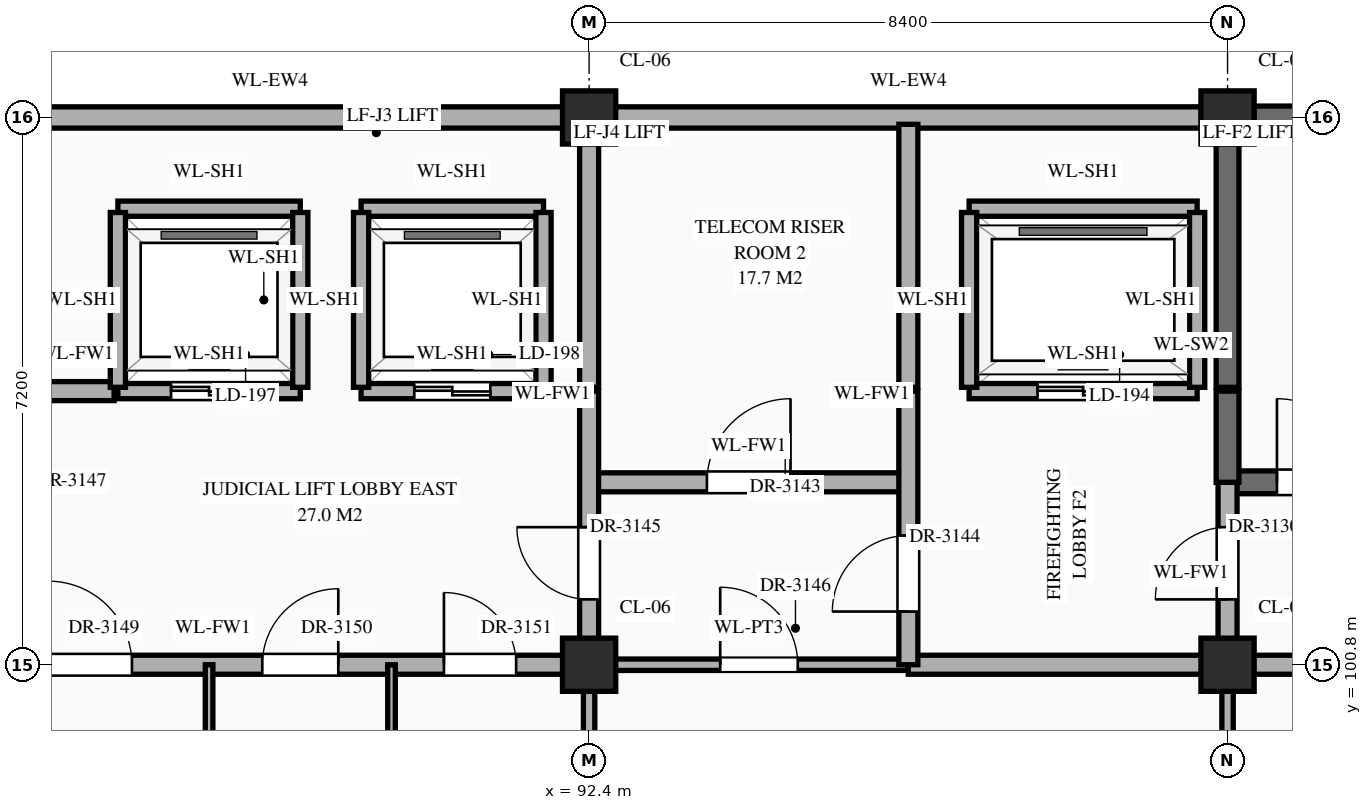
"""IFC4 building model, lengths in metres.
Left out: names, types, materials, properties, quantities, classifications, styles, units other than length and angle.
Written with IfcOpenShell. Run it as: python <this file> out.ifc"""

import sys

from ifc_helpers import new_model, si_unit, direction, frame, frame_2d, origin, origin_2d, place, context, subcontext, project, spatial, rectangle, extrude, element, fill, save


model = new_model("IFC4")
c1 = context("Model", 3, precision=1e-05, world=origin(), true_north=direction((0.0, 1.0)))
c2 = subcontext(c1, "Body", "Model", "MODEL_VIEW")
j1 = project(units=[si_unit("LENGTHUNIT", "METRE"), si_unit("PLANEANGLEUNIT", "RADIAN")], contexts=[c1])
p1 = place(None, origin())
s1 = spatial("IfcSite", under=j1, at=p1, CompositionType="ELEMENT")
p2 = place(p1, origin())
s2 = spatial("IfcBuilding", under=s1, at=p2, CompositionType="ELEMENT")
p3 = place(p2, frame((0.0, 0.0, 56.1)))
s3 = spatial("IfcBuildingStorey", under=s2, at=p3, CompositionType="ELEMENT", Elevation=56.1)
for number, where, z_axis, x_axis in (
    (1, (92.4, 100.8, 0.0), (0.0, 0.0, 1.0), (1.0, 0.0, 0.0)),
    (2, (92.4, 108.0, 0.0), (0.0, 0.0, 1.0), (1.0, 0.0, 0.0)),
    (3, (100.8, 100.8, 0.0), (0.0, 0.0, 1.0), (1.0, 0.0, 0.0)),
    (4, (100.8, 108.0, 0.0), (0.0, 0.0, 1.0), (1.0, 0.0, 0.0)),
):
    element("IfcColumn", number, at=place(p3, frame(where, z_axis=z_axis, x_axis=x_axis)), inside=s3, PredefinedType="COLUMN", context=c2, shape_type="SweptSolid", body=[
        extrude(rectangle(XDim=0.7, YDim=0.7, at=origin_2d()), origin(), (0.0, 0.0, 1.0), 4.2),
    ])
for number, where, z_axis, x_axis in (
    (5, (84.345, 108.0, 0.0), (0.0, 0.0, 1.0), (1.0, 0.0, 0.0)),
    (6, (92.745, 108.0, 0.0), (0.0, 0.0, 1.0), (1.0, 0.0, 0.0)),
):
    element("IfcWall", number, at=place(p3, frame(where, z_axis=z_axis, x_axis=x_axis)), inside=s3, PredefinedType="STANDARD", context=c2, shape_type="SweptSolid", body=[
        extrude(rectangle(XDim=7.71, YDim=0.28, at=frame_2d((3.855, 0.0))), origin(), (0.0, 0.0, 1.0), 3.31),
    ])
p4 = place(p3, frame((101.145, 108.0, 0.0), z_axis=(0.0, 0.0, 1.0), x_axis=(1.0, 0.0, 0.0)))
e7 = element("IfcWall", 7, at=p4, inside=s3, PredefinedType="SHEAR", context=c2, shape_type="SweptSolid", body=[
    extrude(rectangle(XDim=7.71, YDim=0.3, at=frame_2d((3.855, 0.0))), origin(), (0.0, 0.0, 1.0), 3.96),
])
p5 = place(p3, frame((75.6, 100.8, 0.0), z_axis=(0.0, 0.0, 1.0), x_axis=(1.0, 0.0, 0.0)))
e8 = element("IfcWall", 8, at=p5, inside=s3, PredefinedType="STANDARD", context=c2, shape_type="SweptSolid", body=[
    extrude(rectangle(XDim=16.8, YDim=0.25, at=frame_2d((8.4, 0.0))), origin(), (0.0, 0.0, 1.0), 3.11),
])
p6 = place(p5, frame((3.725, 0.0, 0.0)))
e9 = element("IfcOpeningElement", 9, at=p6, cuts=e8, PredefinedType="OPENING", context=c2, shape_type="SweptSolid", body=[
    extrude(rectangle(XDim=0.95, YDim=2.15, at=frame_2d((0.475, 1.075))), frame((0.0, 0.137, 0.0), z_axis=(0.0, -1.0, 0.0), x_axis=(1.0, 0.0, 0.0)), (0.0, 0.0, 1.0), 0.274),
])
p7 = place(p5, frame((9.685, 0.0, 0.0)))
e10 = element("IfcOpeningElement", 10, at=p7, cuts=e8, PredefinedType="OPENING", context=c2, shape_type="SweptSolid", body=[
    extrude(rectangle(XDim=1.1, YDim=2.2, at=frame_2d((0.55, 1.1))), frame((0.0, 0.137, 0.0), z_axis=(0.0, -1.0, 0.0), x_axis=(1.0, 0.0, 0.0)), (0.0, 0.0, 1.0), 0.274),
])
p8 = place(p5, frame((12.5, 0.0, 0.0)))
e11 = element("IfcOpeningElement", 11, at=p8, cuts=e8, PredefinedType="OPENING", context=c2, shape_type="SweptSolid", body=[
    extrude(rectangle(XDim=1.0, YDim=2.2, at=frame_2d((0.5, 1.1))), frame((0.0, 0.137, 0.0), z_axis=(0.0, -1.0, 0.0), x_axis=(1.0, 0.0, 0.0)), (0.0, 0.0, 1.0), 0.274),
])
p9 = place(p5, frame((14.89, 0.0, 0.0)))
e12 = element("IfcOpeningElement", 12, at=p9, cuts=e8, PredefinedType="OPENING", context=c2, shape_type="SweptSolid", body=[
    extrude(rectangle(XDim=0.95, YDim=2.15, at=frame_2d((0.475, 1.075))), frame((0.0, 0.137, 0.0), z_axis=(0.0, -1.0, 0.0), x_axis=(1.0, 0.0, 0.0)), (0.0, 0.0, 1.0), 0.274),
])
p10 = place(p3, frame((92.4, 100.8, 0.0), z_axis=(0.0, 0.0, 1.0), x_axis=(1.0, 0.0, 0.0)))
e13 = element("IfcWall", 13, at=p10, inside=s3, PredefinedType="STANDARD", context=c2, shape_type="SweptSolid", body=[
    extrude(rectangle(XDim=4.2, YDim=0.15, at=frame_2d((2.1, 0.0))), origin(), (0.0, 0.0, 1.0), 3.11),
])
p11 = place(p10, frame((1.725, 0.0, 0.0)))
e14 = element("IfcOpeningElement", 14, at=p11, cuts=e13, PredefinedType="OPENING", context=c2, shape_type="SweptSolid", body=[
    extrude(rectangle(XDim=1.02, YDim=2.4, at=frame_2d((0.51, 1.2))), frame((0.0, 0.087, 0.0), z_axis=(0.0, -1.0, 0.0), x_axis=(1.0, 0.0, 0.0)), (0.0, 0.0, 1.0), 0.174),
])
p12 = place(p3, frame((96.6, 100.8, 0.0), z_axis=(0.0, 0.0, 1.0), x_axis=(1.0, 0.0, 0.0)))
e15 = element("IfcWall", 15, at=p12, inside=s3, PredefinedType="STANDARD", context=c2, shape_type="SweptSolid", body=[
    extrude(rectangle(XDim=12.6, YDim=0.25, at=frame_2d((6.3, 0.0))), origin(), (0.0, 0.0, 1.0), 3.11),
])
p13 = place(p12, frame((7.9, 0.0, 0.0)))
e16 = element("IfcOpeningElement", 16, at=p13, cuts=e15, PredefinedType="OPENING", context=c2, shape_type="SweptSolid", body=[
    extrude(rectangle(XDim=1.0, YDim=2.2, at=frame_2d((0.5, 1.1))), frame((0.0, 0.137, 0.0), z_axis=(0.0, -1.0, 0.0), x_axis=(1.0, 0.0, 0.0)), (0.0, 0.0, 1.0), 0.274),
])
p14 = place(p3, frame((92.4, 103.2, 0.0), z_axis=(0.0, 0.0, 1.0), x_axis=(1.0, 0.0, 0.0)))
e17 = element("IfcWall", 17, at=p14, inside=s3, PredefinedType="STANDARD", context=c2, shape_type="SweptSolid", body=[
    extrude(rectangle(XDim=4.2, YDim=0.25, at=frame_2d((2.1, 0.0))), origin(), (0.0, 0.0, 1.0), 3.96),
])
p15 = place(p14, frame((1.55, 0.0, 0.0)))
e18 = element("IfcOpeningElement", 18, at=p15, cuts=e17, PredefinedType="OPENING", context=c2, shape_type="SweptSolid", body=[
    extrude(rectangle(XDim=1.1, YDim=2.2, at=frame_2d((0.55, 1.1))), frame((0.0, 0.137, 0.0), z_axis=(0.0, -1.0, 0.0), x_axis=(1.0, 0.0, 0.0)), (0.0, 0.0, 1.0), 0.274),
])
p16 = place(p3, frame((100.8, 103.2, 0.0), z_axis=(0.0, 0.0, 1.0), x_axis=(1.0, 0.0, 0.0)))
e19 = element("IfcWall", 19, at=p16, inside=s3, PredefinedType="SHEAR", context=c2, shape_type="SweptSolid", body=[
    extrude(rectangle(XDim=8.4, YDim=0.3, at=frame_2d((4.2, 0.0))), origin(), (0.0, 0.0, 1.0), 3.96),
])
p17 = place(p16, frame((0.65, 0.0, 0.0)))
e20 = element("IfcOpeningElement", 20, at=p17, cuts=e19, PredefinedType="OPENING", context=c2, shape_type="SweptSolid", body=[
    extrude(rectangle(XDim=1.1, YDim=2.2, at=frame_2d((0.55, 1.1))), frame((0.0, 0.162, 0.0), z_axis=(0.0, -1.0, 0.0), x_axis=(1.0, 0.0, 0.0)), (0.0, 0.0, 1.0), 0.324),
])
p18 = place(p3, frame((84.05, 104.4, 0.0), z_axis=(0.0, 0.0, 1.0), x_axis=(1.0, 0.0, 0.0)))
e21 = element("IfcWall", 21, at=p18, inside=s3, PredefinedType="STANDARD", context=c2, shape_type="SweptSolid", body=[
    extrude(rectangle(XDim=2.1, YDim=0.25, at=frame_2d((1.05, 0.0))), origin(), (0.0, 0.0, 1.0), 3.96),
])
p19 = place(p3, frame((86.2, 104.4, 0.0), z_axis=(0.0, 0.0, 1.0), x_axis=(1.0, 0.0, 0.0)))
e22 = element("IfcWall", 22, at=p19, inside=s3, PredefinedType="STANDARD", context=c2, shape_type="SweptSolid", body=[
    extrude(rectangle(XDim=2.4, YDim=0.2, at=frame_2d((1.2, 0.0))), origin(), (0.0, 0.0, 1.0), 3.96),
])
p20 = place(p19, frame((0.7, 0.0, 0.0)))
e23 = element("IfcOpeningElement", 23, at=p20, cuts=e22, PredefinedType="OPENING", context=c2, shape_type="SweptSolid", body=[
    extrude(rectangle(XDim=1.0, YDim=2.15, at=frame_2d((0.5, 1.075))), frame((0.0, 0.112, 0.0), z_axis=(0.0, -1.0, 0.0), x_axis=(1.0, 0.0, 0.0)), (0.0, 0.0, 1.0), 0.224),
])
p21 = place(p3, frame((89.4, 104.4, 0.0), z_axis=(0.0, 0.0, 1.0), x_axis=(1.0, 0.0, 0.0)))
e24 = element("IfcWall", 24, at=p21, inside=s3, PredefinedType="STANDARD", context=c2, shape_type="SweptSolid", body=[
    extrude(rectangle(XDim=2.4, YDim=0.2, at=frame_2d((1.2, 0.0))), origin(), (0.0, 0.0, 1.0), 3.96),
])
p22 = place(p21, frame((0.7, 0.0, 0.0)))
e25 = element("IfcOpeningElement", 25, at=p22, cuts=e24, PredefinedType="OPENING", context=c2, shape_type="SweptSolid", body=[
    extrude(rectangle(XDim=1.0, YDim=2.15, at=frame_2d((0.5, 1.075))), frame((0.0, 0.112, 0.0), z_axis=(0.0, -1.0, 0.0), x_axis=(1.0, 0.0, 0.0)), (0.0, 0.0, 1.0), 0.224),
])
p23 = place(p3, frame((97.4, 104.4, 0.0), z_axis=(0.0, 0.0, 1.0), x_axis=(1.0, 0.0, 0.0)))
e26 = element("IfcWall", 26, at=p23, inside=s3, PredefinedType="STANDARD", context=c2, shape_type="SweptSolid", body=[
    extrude(rectangle(XDim=3.0, YDim=0.2, at=frame_2d((1.5, 0.0))), origin(), (0.0, 0.0, 1.0), 3.96),
])
p24 = place(p23, frame((0.9, 0.0, 0.0)))
e27 = element("IfcOpeningElement", 27, at=p24, cuts=e26, PredefinedType="OPENING", context=c2, shape_type="SweptSolid", body=[
    extrude(rectangle(XDim=1.2, YDim=2.15, at=frame_2d((0.6, 1.075))), frame((0.0, 0.112, 0.0), z_axis=(0.0, -1.0, 0.0), x_axis=(1.0, 0.0, 0.0)), (0.0, 0.0, 1.0), 0.224),
])
for number, where, z_axis, x_axis in (
    (28, (86.2, 106.8, 0.0), (0.0, 0.0, 1.0), (1.0, 0.0, 0.0)),
    (29, (89.4, 106.8, 0.0), (0.0, 0.0, 1.0), (1.0, 0.0, 0.0)),
):
    element("IfcWall", number, at=place(p3, frame(where, z_axis=z_axis, x_axis=x_axis)), inside=s3, PredefinedType="STANDARD", context=c2, shape_type="SweptSolid", body=[
        extrude(rectangle(XDim=2.4, YDim=0.2, at=frame_2d((1.2, 0.0))), origin(), (0.0, 0.0, 1.0), 3.96),
    ])
p25 = place(p3, frame((97.4, 106.8, 0.0), z_axis=(0.0, 0.0, 1.0), x_axis=(1.0, 0.0, 0.0)))
e30 = element("IfcWall", 30, at=p25, inside=s3, PredefinedType="STANDARD", context=c2, shape_type="SweptSolid", body=[
    extrude(rectangle(XDim=3.0, YDim=0.2, at=frame_2d((1.5, 0.0))), origin(), (0.0, 0.0, 1.0), 3.96),
])
p26 = place(p3, frame((86.2, 104.45, 0.0), z_axis=(0.0, 0.0, 1.0), x_axis=(0.0, 1.0, 0.0)))
e31 = element("IfcWall", 31, at=p26, inside=s3, PredefinedType="STANDARD", context=c2, shape_type="SweptSolid", body=[
    extrude(rectangle(XDim=2.3, YDim=0.2, at=frame_2d((1.15, 0.0))), origin(), (0.0, 0.0, 1.0), 3.96),
])
p27 = place(p3, frame((87.4, 96.0, 0.0), z_axis=(0.0, 0.0, 1.0), x_axis=(0.0, 1.0, 0.0)))
e32 = element("IfcWall", 32, at=p27, inside=s3, PredefinedType="STANDARD", context=c2, shape_type="SweptSolid", body=[
    extrude(rectangle(XDim=4.8, YDim=0.1, at=frame_2d((2.4, 0.0))), origin(), (0.0, 0.0, 1.0), 3.96),
])
p28 = place(p27, frame((1.76, 0.0, 0.0)))
e33 = element("IfcOpeningElement", 33, at=p28, cuts=e32, PredefinedType="OPENING", context=c2, shape_type="SweptSolid", body=[
    extrude(rectangle(XDim=1.28, YDim=2.35, at=frame_2d((0.64, 1.175))), frame((0.0, 0.062, 0.0), z_axis=(0.0, -1.0, 0.0), x_axis=(1.0, 0.0, 0.0)), (0.0, 0.0, 1.0), 0.124),
])
for number, where, z_axis, x_axis in (
    (34, (88.6, 104.45, 0.0), (0.0, 0.0, 1.0), (0.0, 1.0, 0.0)),
    (35, (89.4, 104.45, 0.0), (0.0, 0.0, 1.0), (0.0, 1.0, 0.0)),
):
    element("IfcWall", number, at=place(p3, frame(where, z_axis=z_axis, x_axis=x_axis)), inside=s3, PredefinedType="STANDARD", context=c2, shape_type="SweptSolid", body=[
        extrude(rectangle(XDim=2.3, YDim=0.2, at=frame_2d((1.15, 0.0))), origin(), (0.0, 0.0, 1.0), 3.96),
    ])
p29 = place(p3, frame((89.8, 96.0, 0.0), z_axis=(0.0, 0.0, 1.0), x_axis=(0.0, 1.0, 0.0)))
e36 = element("IfcWall", 36, at=p29, inside=s3, PredefinedType="STANDARD", context=c2, shape_type="SweptSolid", body=[
    extrude(rectangle(XDim=4.8, YDim=0.1, at=frame_2d((2.4, 0.0))), origin(), (0.0, 0.0, 1.0), 3.96),
])
p30 = place(p29, frame((1.93, 0.0, 0.0)))
e37 = element("IfcOpeningElement", 37, at=p30, cuts=e36, PredefinedType="OPENING", context=c2, shape_type="SweptSolid", body=[
    extrude(rectangle(XDim=0.94, YDim=2.3, at=frame_2d((0.47, 1.15))), frame((0.0, 0.062, 0.0), z_axis=(0.0, -1.0, 0.0), x_axis=(1.0, 0.0, 0.0)), (0.0, 0.0, 1.0), 0.124),
])
p31 = place(p3, frame((91.8, 104.45, 0.0), z_axis=(0.0, 0.0, 1.0), x_axis=(0.0, 1.0, 0.0)))
e38 = element("IfcWall", 38, at=p31, inside=s3, PredefinedType="STANDARD", context=c2, shape_type="SweptSolid", body=[
    extrude(rectangle(XDim=2.3, YDim=0.2, at=frame_2d((1.15, 0.0))), origin(), (0.0, 0.0, 1.0), 3.96),
])
p32 = place(p3, frame((92.4, 96.0, 0.0), z_axis=(0.0, 0.0, 1.0), x_axis=(0.0, 1.0, 0.0)))
e39 = element("IfcWall", 39, at=p32, inside=s3, PredefinedType="STANDARD", context=c2, shape_type="SweptSolid", body=[
    extrude(rectangle(XDim=4.8, YDim=0.15, at=frame_2d((2.4, 0.0))), origin(), (0.0, 0.0, 1.0), 3.21),
])
p33 = place(p3, frame((92.4, 100.8, 0.0), z_axis=(0.0, 0.0, 1.0), x_axis=(0.0, 1.0, 0.0)))
e40 = element("IfcWall", 40, at=p33, inside=s3, PredefinedType="STANDARD", context=c2, shape_type="SweptSolid", body=[
    extrude(rectangle(XDim=3.6, YDim=0.25, at=frame_2d((1.8, 0.0))), origin(), (0.0, 0.0, 1.0), 3.21),
])
p34 = place(p33, frame((0.86, 0.0, 0.0)))
e41 = element("IfcOpeningElement", 41, at=p34, cuts=e40, PredefinedType="OPENING", context=c2, shape_type="SweptSolid", body=[
    extrude(rectangle(XDim=0.95, YDim=2.15, at=frame_2d((0.475, 1.075))), frame((0.0, 0.137, 0.0), z_axis=(0.0, -1.0, 0.0), x_axis=(1.0, 0.0, 0.0)), (0.0, 0.0, 1.0), 0.274),
])
p35 = place(p3, frame((92.4, 104.45, 0.0), z_axis=(0.0, 0.0, 1.0), x_axis=(0.0, 1.0, 0.0)))
e42 = element("IfcWall", 42, at=p35, inside=s3, PredefinedType="STANDARD", context=c2, shape_type="SweptSolid", body=[
    extrude(rectangle(XDim=3.46, YDim=0.25, at=frame_2d((1.73, 0.0))), origin(), (0.0, 0.0, 1.0), 3.21),
])
p36 = place(p3, frame((96.6, 100.8, 0.0), z_axis=(0.0, 0.0, 1.0), x_axis=(0.0, 1.0, 0.0)))
e43 = element("IfcWall", 43, at=p36, inside=s3, PredefinedType="STANDARD", context=c2, shape_type="SweptSolid", body=[
    extrude(rectangle(XDim=3.6, YDim=0.25, at=frame_2d((1.8, 0.0))), origin(), (0.0, 0.0, 1.0), 3.96),
])
p37 = place(p36, frame((0.7, 0.0, 0.0)))
e44 = element("IfcOpeningElement", 44, at=p37, cuts=e43, PredefinedType="OPENING", context=c2, shape_type="SweptSolid", body=[
    extrude(rectangle(XDim=1.0, YDim=2.2, at=frame_2d((0.5, 1.1))), frame((0.0, 0.137, 0.0), z_axis=(0.0, -1.0, 0.0), x_axis=(1.0, 0.0, 0.0)), (0.0, 0.0, 1.0), 0.274),
])
p38 = place(p3, frame((96.6, 104.45, 0.0), z_axis=(0.0, 0.0, 1.0), x_axis=(0.0, 1.0, 0.0)))
e45 = element("IfcWall", 45, at=p38, inside=s3, PredefinedType="STANDARD", context=c2, shape_type="SweptSolid", body=[
    extrude(rectangle(XDim=3.46, YDim=0.25, at=frame_2d((1.73, 0.0))), origin(), (0.0, 0.0, 1.0), 3.96),
])
for number, where, z_axis, x_axis in (
    (46, (97.4, 104.45, 0.0), (0.0, 0.0, 1.0), (0.0, 1.0, 0.0)),
    (47, (100.4, 104.45, 0.0), (0.0, 0.0, 1.0), (0.0, 1.0, 0.0)),
):
    element("IfcWall", number, at=place(p3, frame(where, z_axis=z_axis, x_axis=x_axis)), inside=s3, PredefinedType="STANDARD", context=c2, shape_type="SweptSolid", body=[
        extrude(rectangle(XDim=2.3, YDim=0.2, at=frame_2d((1.15, 0.0))), origin(), (0.0, 0.0, 1.0), 3.96),
    ])
p39 = place(p3, frame((100.8, 96.0, 0.0), z_axis=(0.0, 0.0, 1.0), x_axis=(0.0, 1.0, 0.0)))
e48 = element("IfcWall", 48, at=p39, inside=s3, PredefinedType="STANDARD", context=c2, shape_type="SweptSolid", body=[
    extrude(rectangle(XDim=4.8, YDim=0.15, at=frame_2d((2.4, 0.0))), origin(), (0.0, 0.0, 1.0), 3.21),
])
p40 = place(p3, frame((100.8, 100.8, 0.0), z_axis=(0.0, 0.0, 1.0), x_axis=(0.0, 1.0, 0.0)))
e49 = element("IfcWall", 49, at=p40, inside=s3, PredefinedType="STANDARD", context=c2, shape_type="SweptSolid", body=[
    extrude(rectangle(XDim=2.4, YDim=0.25, at=frame_2d((1.2, 0.0))), origin(), (0.0, 0.0, 1.0), 3.21),
])
p41 = place(p40, frame((0.86, 0.0, 0.0)))
e50 = element("IfcOpeningElement", 50, at=p41, cuts=e49, PredefinedType="OPENING", context=c2, shape_type="SweptSolid", body=[
    extrude(rectangle(XDim=0.95, YDim=2.15, at=frame_2d((0.475, 1.075))), frame((0.0, 0.137, 0.0), z_axis=(0.0, -1.0, 0.0), x_axis=(1.0, 0.0, 0.0)), (0.0, 0.0, 1.0), 0.274),
])
p42 = place(p3, frame((100.8, 103.2, 0.0), z_axis=(0.0, 0.0, 1.0), x_axis=(0.0, 1.0, 0.0)))
e51 = element("IfcWall", 51, at=p42, inside=s3, PredefinedType="SHEAR", context=c2, shape_type="SweptSolid", body=[
    extrude(rectangle(XDim=1.2, YDim=0.3, at=frame_2d((0.6, 0.0))), origin(), (0.0, 0.0, 1.0), 3.96),
])
p43 = place(p3, frame((100.8, 104.45, 0.0), z_axis=(0.0, 0.0, 1.0), x_axis=(0.0, 1.0, 0.0)))
e52 = element("IfcWall", 52, at=p43, inside=s3, PredefinedType="SHEAR", context=c2, shape_type="SweptSolid", body=[
    extrude(rectangle(XDim=3.46, YDim=0.3, at=frame_2d((1.73, 0.0))), origin(), (0.0, 0.0, 1.0), 3.96),
])
p44 = place(p24, origin())
e53 = element("IfcDoor", 53, at=p44, inside=s3, OperationType="DOUBLE_DOOR_SLIDING", PredefinedType="DOOR", context=c2, shape_type="SweptSolid", body=[
    extrude(rectangle(XDim=1.2, YDim=2.15, at=frame_2d((0.6, 1.075))), frame((0.0, 0.025, 0.0), z_axis=(0.0, -1.0, 0.0), x_axis=(1.0, 0.0, 0.0)), (0.0, 0.0, 1.0), 0.05),
])
fill(e27, e53)
p45 = place(p20, origin())
e54 = element("IfcDoor", 54, at=p45, inside=s3, OperationType="DOUBLE_DOOR_SLIDING", PredefinedType="DOOR", context=c2, shape_type="SweptSolid", body=[
    extrude(rectangle(XDim=1.0, YDim=2.15, at=frame_2d((0.5, 1.075))), frame((0.0, 0.025, 0.0), z_axis=(0.0, -1.0, 0.0), x_axis=(1.0, 0.0, 0.0)), (0.0, 0.0, 1.0), 0.05),
])
fill(e23, e54)
p46 = place(p22, origin())
e55 = element("IfcDoor", 55, at=p46, inside=s3, OperationType="DOUBLE_DOOR_SLIDING", PredefinedType="DOOR", context=c2, shape_type="SweptSolid", body=[
    extrude(rectangle(XDim=1.0, YDim=2.15, at=frame_2d((0.5, 1.075))), frame((0.0, 0.025, 0.0), z_axis=(0.0, -1.0, 0.0), x_axis=(1.0, 0.0, 0.0)), (0.0, 0.0, 1.0), 0.05),
])
fill(e25, e55)
p47 = place(p17, origin())
e56 = element("IfcDoor", 56, at=p47, inside=s3, OperationType="SINGLE_SWING_LEFT", PredefinedType="DOOR", context=c2, shape_type="SweptSolid", body=[
    extrude(rectangle(XDim=1.1, YDim=2.2, at=frame_2d((0.55, 1.1))), frame((0.0, 0.025, 0.0), z_axis=(0.0, -1.0, 0.0), x_axis=(1.0, 0.0, 0.0)), (0.0, 0.0, 1.0), 0.05),
])
fill(e20, e56)
p48 = place(p41, origin())
e57 = element("IfcDoor", 57, at=p48, inside=s3, OperationType="SINGLE_SWING_LEFT", PredefinedType="DOOR", context=c2, shape_type="SweptSolid", body=[
    extrude(rectangle(XDim=0.95, YDim=2.15, at=frame_2d((0.475, 1.075))), frame((0.0, 0.025, 0.0), z_axis=(0.0, -1.0, 0.0), x_axis=(1.0, 0.0, 0.0)), (0.0, 0.0, 1.0), 0.05),
])
fill(e50, e57)
p49 = place(p15, origin())
e58 = element("IfcDoor", 58, at=p49, inside=s3, OperationType="SINGLE_SWING_RIGHT", PredefinedType="DOOR", context=c2, shape_type="SweptSolid", body=[
    extrude(rectangle(XDim=1.1, YDim=2.2, at=frame_2d((0.55, 1.1))), frame((0.0, 0.025, 0.0), z_axis=(0.0, -1.0, 0.0), x_axis=(1.0, 0.0, 0.0)), (0.0, 0.0, 1.0), 0.05),
])
fill(e18, e58)
p50 = place(p37, origin())
e59 = element("IfcDoor", 59, at=p50, inside=s3, OperationType="SINGLE_SWING_LEFT", PredefinedType="DOOR", context=c2, shape_type="SweptSolid", body=[
    extrude(rectangle(XDim=1.0, YDim=2.2, at=frame_2d((0.5, 1.1))), frame((0.0, 0.025, 0.0), z_axis=(0.0, -1.0, 0.0), x_axis=(1.0, 0.0, 0.0)), (0.0, 0.0, 1.0), 0.05),
])
fill(e44, e59)
p51 = place(p34, origin())
e60 = element("IfcDoor", 60, at=p51, inside=s3, OperationType="SINGLE_SWING_RIGHT", PredefinedType="DOOR", context=c2, shape_type="SweptSolid", body=[
    extrude(rectangle(XDim=0.95, YDim=2.15, at=frame_2d((0.475, 1.075))), frame((0.0, 0.025, 0.0), z_axis=(0.0, -1.0, 0.0), x_axis=(1.0, 0.0, 0.0)), (0.0, 0.0, 1.0), 0.05),
])
fill(e41, e60)
p52 = place(p11, origin())
e61 = element("IfcDoor", 61, at=p52, inside=s3, OperationType="SINGLE_SWING_LEFT", PredefinedType="DOOR", context=c2, shape_type="SweptSolid", body=[
    extrude(rectangle(XDim=1.02, YDim=2.4, at=frame_2d((0.51, 1.2))), frame((0.0, 0.025, 0.0), z_axis=(0.0, -1.0, 0.0), x_axis=(1.0, 0.0, 0.0)), (0.0, 0.0, 1.0), 0.05),
])
fill(e14, e61)
p53 = place(p7, origin())
e62 = element("IfcDoor", 62, at=p53, inside=s3, OperationType="SINGLE_SWING_LEFT", PredefinedType="DOOR", context=c2, shape_type="SweptSolid", body=[
    extrude(rectangle(XDim=1.1, YDim=2.2, at=frame_2d((0.55, 1.1))), frame((0.0, 0.025, 0.0), z_axis=(0.0, -1.0, 0.0), x_axis=(1.0, 0.0, 0.0)), (0.0, 0.0, 1.0), 0.05),
])
fill(e10, e62)
p54 = place(p8, origin())
e63 = element("IfcDoor", 63, at=p54, inside=s3, OperationType="SINGLE_SWING_RIGHT", PredefinedType="DOOR", context=c2, shape_type="SweptSolid", body=[
    extrude(rectangle(XDim=1.0, YDim=2.2, at=frame_2d((0.5, 1.1))), frame((0.0, 0.025, 0.0), z_axis=(0.0, -1.0, 0.0), x_axis=(1.0, 0.0, 0.0)), (0.0, 0.0, 1.0), 0.05),
])
fill(e11, e63)
p55 = place(p9, origin())
e64 = element("IfcDoor", 64, at=p55, inside=s3, OperationType="SINGLE_SWING_LEFT", PredefinedType="DOOR", context=c2, shape_type="SweptSolid", body=[
    extrude(rectangle(XDim=0.95, YDim=2.15, at=frame_2d((0.475, 1.075))), frame((0.0, 0.025, 0.0), z_axis=(0.0, -1.0, 0.0), x_axis=(1.0, 0.0, 0.0)), (0.0, 0.0, 1.0), 0.05),
])
fill(e12, e64)
save(model, sys.argv[1])
